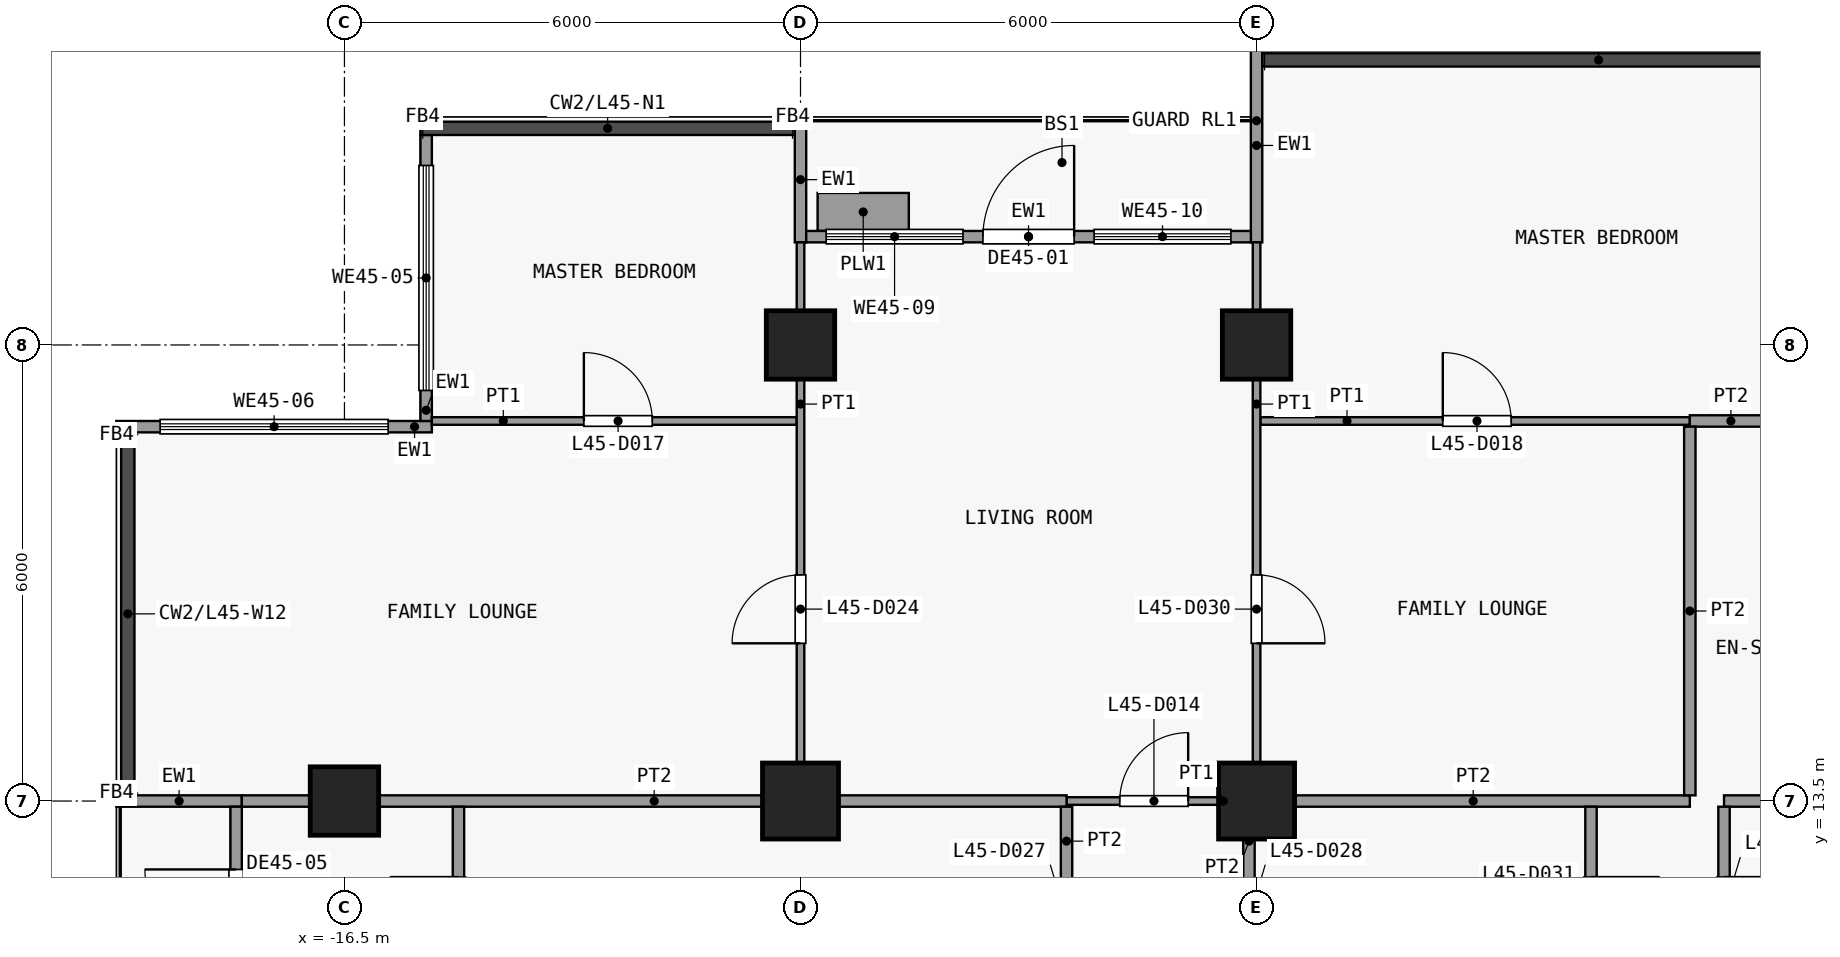
"""IFC4 building model, lengths in metres.
Left out: names, types, materials, properties, quantities, classifications, styles, units other than length and angle.
Written with IfcOpenShell. Run it as: python <this file> out.ifc"""

import sys

from ifc_helpers import new_model, si_unit, direction, frame, frame_2d, origin, origin_2d, place, context, subcontext, project, spatial, rectangle, extrude, element, fill, save


model = new_model("IFC4")
c1 = context("Model", 3, precision=1e-05, world=origin(), true_north=direction((0.0, 1.0)))
c2 = subcontext(c1, "Body", "Model", "MODEL_VIEW")
j1 = project(units=[si_unit("LENGTHUNIT", "METRE"), si_unit("PLANEANGLEUNIT", "RADIAN")], contexts=[c1])
p1 = place(None, origin())
s1 = spatial("IfcSite", under=j1, at=p1, CompositionType="ELEMENT")
p2 = place(p1, origin())
s2 = spatial("IfcBuilding", under=s1, at=p2, CompositionType="ELEMENT")
p3 = place(p2, frame((0.0, 0.0, 181.7)))
s3 = spatial("IfcBuildingStorey", under=s2, at=p3, CompositionType="ELEMENT", Elevation=181.7)
p4 = place(p3, frame((-16.5, 13.5, 0.0), z_axis=(0.0, 0.0, 1.0), x_axis=(1.0, 0.0, 0.0)))
e1 = element("IfcColumn", 1, at=p4, inside=s3, PredefinedType="COLUMN", context=c2, shape_type="SweptSolid", body=[
    extrude(rectangle(XDim=0.9, YDim=0.9, at=origin_2d()), origin(), (0.0, 0.0, 1.0), 3.6),
])
p5 = place(p3, frame((-10.5, 13.5, 0.0), z_axis=(0.0, 0.0, 1.0), x_axis=(1.0, 0.0, 0.0)))
e2 = element("IfcColumn", 2, at=p5, inside=s3, PredefinedType="COLUMN", context=c2, shape_type="SweptSolid", body=[
    extrude(rectangle(XDim=1.0, YDim=1.0, at=origin_2d()), origin(), (0.0, 0.0, 1.0), 3.6),
])
p6 = place(p3, frame((-10.5, 19.5, 0.0), z_axis=(0.0, 0.0, 1.0), x_axis=(1.0, 0.0, 0.0)))
e3 = element("IfcColumn", 3, at=p6, inside=s3, PredefinedType="COLUMN", context=c2, shape_type="SweptSolid", body=[
    extrude(rectangle(XDim=0.9, YDim=0.9, at=origin_2d()), origin(), (0.0, 0.0, 1.0), 3.6),
])
p7 = place(p3, frame((-4.5, 13.5, 0.0), z_axis=(0.0, 0.0, 1.0), x_axis=(1.0, 0.0, 0.0)))
e4 = element("IfcColumn", 4, at=p7, inside=s3, PredefinedType="COLUMN", context=c2, shape_type="SweptSolid", body=[
    extrude(rectangle(XDim=1.0, YDim=1.0, at=origin_2d()), origin(), (0.0, 0.0, 1.0), 3.6),
])
p8 = place(p3, frame((-4.5, 19.5, 0.0), z_axis=(0.0, 0.0, 1.0), x_axis=(1.0, 0.0, 0.0)))
e5 = element("IfcColumn", 5, at=p8, inside=s3, PredefinedType="COLUMN", context=c2, shape_type="SweptSolid", body=[
    extrude(rectangle(XDim=0.9, YDim=0.9, at=origin_2d()), origin(), (0.0, 0.0, 1.0), 3.6),
])
p9 = place(p3, frame((-15.425, 18.5, 0.0), z_axis=(0.0, 0.0, 1.0), x_axis=(0.0, 1.0, 0.0)))
e6 = element("IfcWall", 6, at=p9, inside=s3, PredefinedType="SOLIDWALL", context=c2, shape_type="SweptSolid", body=[
    extrude(rectangle(XDim=3.762, YDim=0.15, at=frame_2d((1.881, 0.0))), origin(), (0.0, 0.0, 1.0), 3.3),
])
p10 = place(p9, frame((0.401, 0.0, 0.9)))
e7 = element("IfcOpeningElement", 7, at=p10, cuts=e6, PredefinedType="OPENING", context=c2, shape_type="SweptSolid", body=[
    extrude(rectangle(XDim=2.96, YDim=2.4, at=frame_2d((1.48, 1.2))), frame((0.0, 0.085, 0.0), z_axis=(0.0, -1.0, 0.0), x_axis=(1.0, 0.0, 0.0)), (0.0, 0.0, 1.0), 0.17),
])
p11 = place(p3, frame((-19.5, 18.425, 0.0), z_axis=(0.0, 0.0, 1.0), x_axis=(1.0, 0.0, 0.0)))
e8 = element("IfcWall", 8, at=p11, inside=s3, PredefinedType="SOLIDWALL", context=c2, shape_type="SweptSolid", body=[
    extrude(rectangle(XDim=4.15, YDim=0.15, at=frame_2d((2.075, 0.0))), origin(), (0.0, 0.0, 1.0), 3.3),
])
p12 = place(p11, frame((0.575, 0.0, 0.9)))
e9 = element("IfcOpeningElement", 9, at=p12, cuts=e8, PredefinedType="OPENING", context=c2, shape_type="SweptSolid", body=[
    extrude(rectangle(XDim=3.0, YDim=2.4, at=frame_2d((1.5, 1.2))), frame((0.0, 0.085, 0.0), z_axis=(0.0, -1.0, 0.0), x_axis=(1.0, 0.0, 0.0)), (0.0, 0.0, 1.0), 0.17),
])
p13 = place(p3, frame((-10.5, 20.85, 0.0), z_axis=(0.0, 0.0, 1.0), x_axis=(0.0, 1.0, 0.0)))
e10 = element("IfcWall", 10, at=p13, inside=s3, PredefinedType="SOLIDWALL", context=c2, shape_type="SweptSolid", body=[
    extrude(rectangle(XDim=1.65, YDim=0.15, at=frame_2d((0.825, 0.0))), origin(), (0.0, 0.0, 1.0), 3.3),
])
p14 = place(p3, frame((-4.5, 20.85, 0.0), z_axis=(0.0, 0.0, 1.0), x_axis=(0.0, 1.0, 0.0)))
e11 = element("IfcWall", 11, at=p14, inside=s3, PredefinedType="SOLIDWALL", context=c2, shape_type="SweptSolid", body=[
    extrude(rectangle(XDim=2.55, YDim=0.15, at=frame_2d((1.275, 0.0))), origin(), (0.0, 0.0, 1.0), 3.3),
])
p15 = place(p3, frame((-10.425, 20.925, 0.0), z_axis=(0.0, 0.0, 1.0), x_axis=(1.0, 0.0, 0.0)))
e12 = element("IfcWall", 12, at=p15, inside=s3, PredefinedType="SOLIDWALL", context=c2, shape_type="SweptSolid", body=[
    extrude(rectangle(XDim=5.85, YDim=0.15, at=frame_2d((2.925, 0.0))), origin(), (0.0, 0.0, 1.0), 3.3),
])
p16 = place(p15, frame((2.325, 0.0, 0.0)))
e13 = element("IfcOpeningElement", 13, at=p16, cuts=e12, PredefinedType="OPENING", context=c2, shape_type="SweptSolid", body=[
    extrude(rectangle(XDim=1.2, YDim=2.4, at=frame_2d((0.6, 1.2))), frame((0.0, 0.085, 0.0), z_axis=(0.0, -1.0, 0.0), x_axis=(1.0, 0.0, 0.0)), (0.0, 0.0, 1.0), 0.17),
])
p17 = place(p15, frame((0.262, 0.0, 0.9)))
e14 = element("IfcOpeningElement", 14, at=p17, cuts=e12, PredefinedType="OPENING", context=c2, shape_type="SweptSolid", body=[
    extrude(rectangle(XDim=1.8, YDim=2.1, at=frame_2d((0.9, 1.05))), frame((0.0, 0.085, 0.0), z_axis=(0.0, -1.0, 0.0), x_axis=(1.0, 0.0, 0.0)), (0.0, 0.0, 1.0), 0.17),
])
p18 = place(p15, frame((3.788, 0.0, 0.9)))
e15 = element("IfcOpeningElement", 15, at=p18, cuts=e12, PredefinedType="OPENING", context=c2, shape_type="SweptSolid", body=[
    extrude(rectangle(XDim=1.8, YDim=2.1, at=frame_2d((0.9, 1.05))), frame((0.0, 0.085, 0.0), z_axis=(0.0, -1.0, 0.0), x_axis=(1.0, 0.0, 0.0)), (0.0, 0.0, 1.0), 0.17),
])
p19 = place(p3, frame((-10.275, 21.25, 0.0), z_axis=(0.0, 0.0, 1.0), x_axis=(1.0, 0.0, 0.0)))
e16 = element("IfcWall", 16, at=p19, inside=s3, PredefinedType="USERDEFINED", context=c2, shape_type="SweptSolid", body=[
    extrude(rectangle(XDim=1.2, YDim=0.5, at=frame_2d((0.6, 0.0))), origin(), (0.0, 0.0, 1.0), 0.9),
])
p20 = place(p3, frame((-17.85, 13.5, 0.0), z_axis=(0.0, 0.0, 1.0), x_axis=(-1.0, 0.0, 0.0)))
e17 = element("IfcWall", 17, at=p20, inside=s3, PredefinedType="SOLIDWALL", context=c2, shape_type="SweptSolid", body=[
    extrude(rectangle(XDim=1.65, YDim=0.15, at=frame_2d((0.825, 0.0))), origin(), (0.0, 0.0, 1.0), 3.3),
])
p21 = place(p3, frame((-17.925, 7.575, 0.0), z_axis=(0.0, 0.0, 1.0), x_axis=(0.0, 1.0, 0.0)))
e18 = element("IfcWall", 18, at=p21, inside=s3, PredefinedType="SOLIDWALL", context=c2, shape_type="SweptSolid", body=[
    extrude(rectangle(XDim=5.85, YDim=0.15, at=frame_2d((2.925, 0.0))), origin(), (0.0, 0.0, 1.0), 3.3),
])
p22 = place(p21, frame((3.825, 0.0, 0.0)))
e19 = element("IfcOpeningElement", 19, at=p22, cuts=e18, PredefinedType="OPENING", context=c2, shape_type="SweptSolid", body=[
    extrude(rectangle(XDim=1.2, YDim=2.4, at=frame_2d((0.6, 1.2))), frame((0.0, 0.085, 0.0), z_axis=(0.0, -1.0, 0.0), x_axis=(1.0, 0.0, 0.0)), (0.0, 0.0, 1.0), 0.17),
])
p23 = place(p21, frame((1.012, 0.0, 0.9)))
e20 = element("IfcOpeningElement", 20, at=p23, cuts=e18, PredefinedType="OPENING", context=c2, shape_type="SweptSolid", body=[
    extrude(rectangle(XDim=1.8, YDim=2.1, at=frame_2d((0.9, 1.05))), frame((0.0, 0.085, 0.0), z_axis=(0.0, -1.0, 0.0), x_axis=(1.0, 0.0, 0.0)), (0.0, 0.0, 1.0), 0.17),
])
p24 = place(p3, frame((-7.0, 13.5, 0.0), z_axis=(0.0, 0.0, 1.0), x_axis=(1.0, 0.0, 0.0)))
e21 = element("IfcWall", 21, at=p24, inside=s3, PredefinedType="PARTITIONING", context=c2, shape_type="SweptSolid", body=[
    extrude(rectangle(XDim=2.4, YDim=0.1, at=frame_2d((1.2, 0.0))), origin(), (0.0, 0.0, 1.0), 3.3),
])
p25 = place(p24, frame((0.7, 0.0, 0.0)))
e22 = element("IfcOpeningElement", 22, at=p25, cuts=e21, PredefinedType="OPENING", context=c2, shape_type="SweptSolid", body=[
    extrude(rectangle(XDim=0.9, YDim=2.1, at=frame_2d((0.45, 1.05))), frame((0.0, 0.06, 0.0), z_axis=(0.0, -1.0, 0.0), x_axis=(1.0, 0.0, 0.0)), (0.0, 0.0, 1.0), 0.12),
])
p26 = place(p3, frame((-17.85, 13.5, 0.0), z_axis=(0.0, 0.0, 1.0), x_axis=(1.0, 0.0, 0.0)))
e23 = element("IfcWall", 23, at=p26, inside=s3, PredefinedType="PARTITIONING", context=c2, shape_type="SweptSolid", body=[
    extrude(rectangle(XDim=10.85, YDim=0.15, at=frame_2d((5.425, 0.0))), origin(), (0.0, 0.0, 1.0), 3.3),
])
p27 = place(p3, frame((-4.5, 13.5, 0.0), z_axis=(0.0, 0.0, 1.0), x_axis=(1.0, 0.0, 0.0)))
e24 = element("IfcWall", 24, at=p27, inside=s3, PredefinedType="PARTITIONING", context=c2, shape_type="SweptSolid", body=[
    extrude(rectangle(XDim=5.7, YDim=0.15, at=frame_2d((2.85, 0.0))), origin(), (0.0, 0.0, 1.0), 3.3),
])
p28 = place(p3, frame((1.65, 13.5, 0.0), z_axis=(0.0, 0.0, 1.0), x_axis=(1.0, 0.0, 0.0)))
e25 = element("IfcWall", 25, at=p28, inside=s3, PredefinedType="PARTITIONING", context=c2, shape_type="SweptSolid", body=[
    extrude(rectangle(XDim=5.35, YDim=0.15, at=frame_2d((2.675, 0.0))), origin(), (0.0, 0.0, 1.0), 3.3),
])
p29 = place(p3, frame((-15.35, 18.5, 0.0), z_axis=(0.0, 0.0, 1.0), x_axis=(1.0, 0.0, 0.0)))
e26 = element("IfcWall", 26, at=p29, inside=s3, PredefinedType="PARTITIONING", context=c2, shape_type="SweptSolid", body=[
    extrude(rectangle(XDim=4.8, YDim=0.1, at=frame_2d((2.4, 0.0))), origin(), (0.0, 0.0, 1.0), 3.3),
])
p30 = place(p29, frame((2.0, 0.0, 0.0)))
e27 = element("IfcOpeningElement", 27, at=p30, cuts=e26, PredefinedType="OPENING", context=c2, shape_type="SweptSolid", body=[
    extrude(rectangle(XDim=0.9, YDim=2.1, at=frame_2d((0.45, 1.05))), frame((0.0, 0.06, 0.0), z_axis=(0.0, -1.0, 0.0), x_axis=(1.0, 0.0, 0.0)), (0.0, 0.0, 1.0), 0.12),
])
p31 = place(p3, frame((-4.45, 18.5, 0.0), z_axis=(0.0, 0.0, 1.0), x_axis=(1.0, 0.0, 0.0)))
e28 = element("IfcWall", 28, at=p31, inside=s3, PredefinedType="PARTITIONING", context=c2, shape_type="SweptSolid", body=[
    extrude(rectangle(XDim=5.65, YDim=0.1, at=frame_2d((2.825, 0.0))), origin(), (0.0, 0.0, 1.0), 3.3),
])
p32 = place(p31, frame((2.4, 0.0, 0.0)))
e29 = element("IfcOpeningElement", 29, at=p32, cuts=e28, PredefinedType="OPENING", context=c2, shape_type="SweptSolid", body=[
    extrude(rectangle(XDim=0.9, YDim=2.1, at=frame_2d((0.45, 1.05))), frame((0.0, 0.06, 0.0), z_axis=(0.0, -1.0, 0.0), x_axis=(1.0, 0.0, 0.0)), (0.0, 0.0, 1.0), 0.12),
])
p33 = place(p3, frame((1.2, 18.5, 0.0), z_axis=(0.0, 0.0, 1.0), x_axis=(1.0, 0.0, 0.0)))
e30 = element("IfcWall", 30, at=p33, inside=s3, PredefinedType="PARTITIONING", context=c2, shape_type="SweptSolid", body=[
    extrude(rectangle(XDim=3.2, YDim=0.15, at=frame_2d((1.6, 0.0))), origin(), (0.0, 0.0, 1.0), 3.3),
])
p34 = place(p33, frame((1.2, 0.0, 0.0)))
e31 = element("IfcOpeningElement", 31, at=p34, cuts=e30, PredefinedType="OPENING", context=c2, shape_type="SweptSolid", body=[
    extrude(rectangle(XDim=0.9, YDim=2.1, at=frame_2d((0.45, 1.05))), frame((0.0, 0.085, 0.0), z_axis=(0.0, -1.0, 0.0), x_axis=(1.0, 0.0, 0.0)), (0.0, 0.0, 1.0), 0.17),
])
p35 = place(p3, frame((-15.0, 10.6, 0.0), z_axis=(0.0, 0.0, 1.0), x_axis=(0.0, 1.0, 0.0)))
e32 = element("IfcWall", 32, at=p35, inside=s3, PredefinedType="PARTITIONING", context=c2, shape_type="SweptSolid", body=[
    extrude(rectangle(XDim=2.825, YDim=0.15, at=frame_2d((1.413, 0.0))), origin(), (0.0, 0.0, 1.0), 3.3),
])
p36 = place(p35, frame((1.0, 0.0, 0.0)))
e33 = element("IfcOpeningElement", 33, at=p36, cuts=e32, PredefinedType="OPENING", context=c2, shape_type="SweptSolid", body=[
    extrude(rectangle(XDim=0.9, YDim=2.1, at=frame_2d((0.45, 1.05))), frame((0.0, 0.085, 0.0), z_axis=(0.0, -1.0, 0.0), x_axis=(1.0, 0.0, 0.0)), (0.0, 0.0, 1.0), 0.17),
])
p37 = place(p3, frame((-10.5, 13.575, 0.0), z_axis=(0.0, 0.0, 1.0), x_axis=(0.0, 1.0, 0.0)))
e34 = element("IfcWall", 34, at=p37, inside=s3, PredefinedType="PARTITIONING", context=c2, shape_type="SweptSolid", body=[
    extrude(rectangle(XDim=7.275, YDim=0.1, at=frame_2d((3.638, 0.0))), origin(), (0.0, 0.0, 1.0), 3.3),
])
p38 = place(p37, frame((2.0, 0.0, 0.0)))
e35 = element("IfcOpeningElement", 35, at=p38, cuts=e34, PredefinedType="OPENING", context=c2, shape_type="SweptSolid", body=[
    extrude(rectangle(XDim=0.9, YDim=2.1, at=frame_2d((0.45, 1.05))), frame((0.0, 0.06, 0.0), z_axis=(0.0, -1.0, 0.0), x_axis=(1.0, 0.0, 0.0)), (0.0, 0.0, 1.0), 0.12),
])
p39 = place(p3, frame((-7.0, 10.6, 0.0), z_axis=(0.0, 0.0, 1.0), x_axis=(0.0, 1.0, 0.0)))
e36 = element("IfcWall", 36, at=p39, inside=s3, PredefinedType="PARTITIONING", context=c2, shape_type="SweptSolid", body=[
    extrude(rectangle(XDim=2.825, YDim=0.15, at=frame_2d((1.413, 0.0))), origin(), (0.0, 0.0, 1.0), 3.3),
])
p40 = place(p39, frame((0.9, 0.0, 0.0)))
e37 = element("IfcOpeningElement", 37, at=p40, cuts=e36, PredefinedType="OPENING", context=c2, shape_type="SweptSolid", body=[
    extrude(rectangle(XDim=0.9, YDim=2.1, at=frame_2d((0.45, 1.05))), frame((0.0, 0.085, 0.0), z_axis=(0.0, -1.0, 0.0), x_axis=(1.0, 0.0, 0.0)), (0.0, 0.0, 1.0), 0.17),
])
p41 = place(p3, frame((-4.6, 10.6, 0.0), z_axis=(0.0, 0.0, 1.0), x_axis=(0.0, 1.0, 0.0)))
e38 = element("IfcWall", 38, at=p41, inside=s3, PredefinedType="PARTITIONING", context=c2, shape_type="SweptSolid", body=[
    extrude(rectangle(XDim=2.825, YDim=0.15, at=frame_2d((1.413, 0.0))), origin(), (0.0, 0.0, 1.0), 3.3),
])
p42 = place(p41, frame((0.9, 0.0, 0.0)))
e39 = element("IfcOpeningElement", 39, at=p42, cuts=e38, PredefinedType="OPENING", context=c2, shape_type="SweptSolid", body=[
    extrude(rectangle(XDim=0.9, YDim=2.1, at=frame_2d((0.45, 1.05))), frame((0.0, 0.085, 0.0), z_axis=(0.0, -1.0, 0.0), x_axis=(1.0, 0.0, 0.0)), (0.0, 0.0, 1.0), 0.17),
])
p43 = place(p3, frame((-4.5, 13.575, 0.0), z_axis=(0.0, 0.0, 1.0), x_axis=(0.0, 1.0, 0.0)))
e40 = element("IfcWall", 40, at=p43, inside=s3, PredefinedType="PARTITIONING", context=c2, shape_type="SweptSolid", body=[
    extrude(rectangle(XDim=7.275, YDim=0.1, at=frame_2d((3.638, 0.0))), origin(), (0.0, 0.0, 1.0), 3.3),
])
p44 = place(p43, frame((2.0, 0.0, 0.0)))
e41 = element("IfcOpeningElement", 41, at=p44, cuts=e40, PredefinedType="OPENING", context=c2, shape_type="SweptSolid", body=[
    extrude(rectangle(XDim=0.9, YDim=2.1, at=frame_2d((0.45, 1.05))), frame((0.0, 0.06, 0.0), z_axis=(0.0, -1.0, 0.0), x_axis=(1.0, 0.0, 0.0)), (0.0, 0.0, 1.0), 0.12),
])
p45 = place(p3, frame((-0.1, 10.6, 0.0), z_axis=(0.0, 0.0, 1.0), x_axis=(0.0, 1.0, 0.0)))
e42 = element("IfcWall", 42, at=p45, inside=s3, PredefinedType="PARTITIONING", context=c2, shape_type="SweptSolid", body=[
    extrude(rectangle(XDim=2.825, YDim=0.15, at=frame_2d((1.413, 0.0))), origin(), (0.0, 0.0, 1.0), 3.3),
])
p46 = place(p45, frame((1.0, 0.0, 0.0)))
e43 = element("IfcOpeningElement", 43, at=p46, cuts=e42, PredefinedType="OPENING", context=c2, shape_type="SweptSolid", body=[
    extrude(rectangle(XDim=0.9, YDim=2.1, at=frame_2d((0.45, 1.05))), frame((0.0, 0.085, 0.0), z_axis=(0.0, -1.0, 0.0), x_axis=(1.0, 0.0, 0.0)), (0.0, 0.0, 1.0), 0.17),
])
p47 = place(p3, frame((1.2, 13.575, 0.0), z_axis=(0.0, 0.0, 1.0), x_axis=(0.0, 1.0, 0.0)))
e44 = element("IfcWall", 44, at=p47, inside=s3, PredefinedType="PARTITIONING", context=c2, shape_type="SweptSolid", body=[
    extrude(rectangle(XDim=4.85, YDim=0.15, at=frame_2d((2.425, 0.0))), origin(), (0.0, 0.0, 1.0), 3.3),
])
p48 = place(p3, frame((1.65, 10.6, 0.0), z_axis=(0.0, 0.0, 1.0), x_axis=(0.0, 1.0, 0.0)))
e45 = element("IfcWall", 45, at=p48, inside=s3, PredefinedType="PARTITIONING", context=c2, shape_type="SweptSolid", body=[
    extrude(rectangle(XDim=2.825, YDim=0.15, at=frame_2d((1.413, 0.0))), origin(), (0.0, 0.0, 1.0), 3.3),
])
p49 = place(p48, frame((1.0, 0.0, 0.0)))
e46 = element("IfcOpeningElement", 46, at=p49, cuts=e45, PredefinedType="OPENING", context=c2, shape_type="SweptSolid", body=[
    extrude(rectangle(XDim=0.9, YDim=2.1, at=frame_2d((0.45, 1.05))), frame((0.0, 0.085, 0.0), z_axis=(0.0, -1.0, 0.0), x_axis=(1.0, 0.0, 0.0)), (0.0, 0.0, 1.0), 0.17),
])
p50 = place(p10, origin())
e47 = element("IfcWindow", 47, at=p50, inside=s3, PartitioningType="SINGLE_PANEL", PredefinedType="WINDOW", context=c2, shape_type="SweptSolid", body=[
    extrude(rectangle(XDim=2.96, YDim=2.4, at=frame_2d((1.48, 1.2))), frame((0.0, 0.03, 0.0), z_axis=(0.0, -1.0, 0.0), x_axis=(1.0, 0.0, 0.0)), (0.0, 0.0, 1.0), 0.06),
])
fill(e7, e47)
p51 = place(p12, origin())
e48 = element("IfcWindow", 48, at=p51, inside=s3, PartitioningType="SINGLE_PANEL", PredefinedType="WINDOW", context=c2, shape_type="SweptSolid", body=[
    extrude(rectangle(XDim=3.0, YDim=2.4, at=frame_2d((1.5, 1.2))), frame((0.0, 0.03, 0.0), z_axis=(0.0, -1.0, 0.0), x_axis=(1.0, 0.0, 0.0)), (0.0, 0.0, 1.0), 0.06),
])
fill(e9, e48)
p52 = place(p16, origin())
e49 = element("IfcDoor", 49, at=p52, inside=s3, OperationType="SINGLE_SWING_RIGHT", PredefinedType="DOOR", context=c2, shape_type="SweptSolid", body=[
    extrude(rectangle(XDim=1.2, YDim=2.4, at=frame_2d((0.6, 1.2))), frame((0.0, 0.025, 0.0), z_axis=(0.0, -1.0, 0.0), x_axis=(1.0, 0.0, 0.0)), (0.0, 0.0, 1.0), 0.05),
])
fill(e13, e49)
p53 = place(p17, origin())
e50 = element("IfcWindow", 50, at=p53, inside=s3, PartitioningType="SINGLE_PANEL", PredefinedType="WINDOW", context=c2, shape_type="SweptSolid", body=[
    extrude(rectangle(XDim=1.8, YDim=2.1, at=frame_2d((0.9, 1.05))), frame((0.0, 0.03, 0.0), z_axis=(0.0, -1.0, 0.0), x_axis=(1.0, 0.0, 0.0)), (0.0, 0.0, 1.0), 0.06),
])
fill(e14, e50)
p54 = place(p18, origin())
e51 = element("IfcWindow", 51, at=p54, inside=s3, PartitioningType="SINGLE_PANEL", PredefinedType="WINDOW", context=c2, shape_type="SweptSolid", body=[
    extrude(rectangle(XDim=1.8, YDim=2.1, at=frame_2d((0.9, 1.05))), frame((0.0, 0.03, 0.0), z_axis=(0.0, -1.0, 0.0), x_axis=(1.0, 0.0, 0.0)), (0.0, 0.0, 1.0), 0.06),
])
fill(e15, e51)
p55 = place(p22, origin())
e52 = element("IfcDoor", 52, at=p55, inside=s3, OperationType="SINGLE_SWING_RIGHT", PredefinedType="DOOR", context=c2, shape_type="SweptSolid", body=[
    extrude(rectangle(XDim=1.2, YDim=2.4, at=frame_2d((0.6, 1.2))), frame((0.0, 0.025, 0.0), z_axis=(0.0, -1.0, 0.0), x_axis=(1.0, 0.0, 0.0)), (0.0, 0.0, 1.0), 0.05),
])
fill(e19, e52)
p56 = place(p25, origin())
e53 = element("IfcDoor", 53, at=p56, inside=s3, OperationType="SINGLE_SWING_LEFT", PredefinedType="DOOR", context=c2, shape_type="SweptSolid", body=[
    extrude(rectangle(XDim=0.9, YDim=2.1, at=frame_2d((0.45, 1.05))), frame((0.0, 0.025, 0.0), z_axis=(0.0, -1.0, 0.0), x_axis=(1.0, 0.0, 0.0)), (0.0, 0.0, 1.0), 0.05),
])
fill(e22, e53)
p57 = place(p30, origin())
e54 = element("IfcDoor", 54, at=p57, inside=s3, OperationType="SINGLE_SWING_RIGHT", PredefinedType="DOOR", context=c2, shape_type="SweptSolid", body=[
    extrude(rectangle(XDim=0.9, YDim=2.1, at=frame_2d((0.45, 1.05))), frame((0.0, 0.025, 0.0), z_axis=(0.0, -1.0, 0.0), x_axis=(1.0, 0.0, 0.0)), (0.0, 0.0, 1.0), 0.05),
])
fill(e27, e54)
p58 = place(p32, origin())
e55 = element("IfcDoor", 55, at=p58, inside=s3, OperationType="SINGLE_SWING_RIGHT", PredefinedType="DOOR", context=c2, shape_type="SweptSolid", body=[
    extrude(rectangle(XDim=0.9, YDim=2.1, at=frame_2d((0.45, 1.05))), frame((0.0, 0.025, 0.0), z_axis=(0.0, -1.0, 0.0), x_axis=(1.0, 0.0, 0.0)), (0.0, 0.0, 1.0), 0.05),
])
fill(e29, e55)
p59 = place(p38, origin())
e56 = element("IfcDoor", 56, at=p59, inside=s3, OperationType="SINGLE_SWING_RIGHT", PredefinedType="DOOR", context=c2, shape_type="SweptSolid", body=[
    extrude(rectangle(XDim=0.9, YDim=2.1, at=frame_2d((0.45, 1.05))), frame((0.0, 0.025, 0.0), z_axis=(0.0, -1.0, 0.0), x_axis=(1.0, 0.0, 0.0)), (0.0, 0.0, 1.0), 0.05),
])
fill(e35, e56)
p60 = place(p44, origin())
e57 = element("IfcDoor", 57, at=p60, inside=s3, OperationType="SINGLE_SWING_LEFT", PredefinedType="DOOR", context=c2, shape_type="SweptSolid", body=[
    extrude(rectangle(XDim=0.9, YDim=2.1, at=frame_2d((0.45, 1.05))), frame((0.0, 0.025, 0.0), z_axis=(0.0, -1.0, 0.0), x_axis=(1.0, 0.0, 0.0)), (0.0, 0.0, 1.0), 0.05),
])
fill(e41, e57)
save(model, sys.argv[1])
